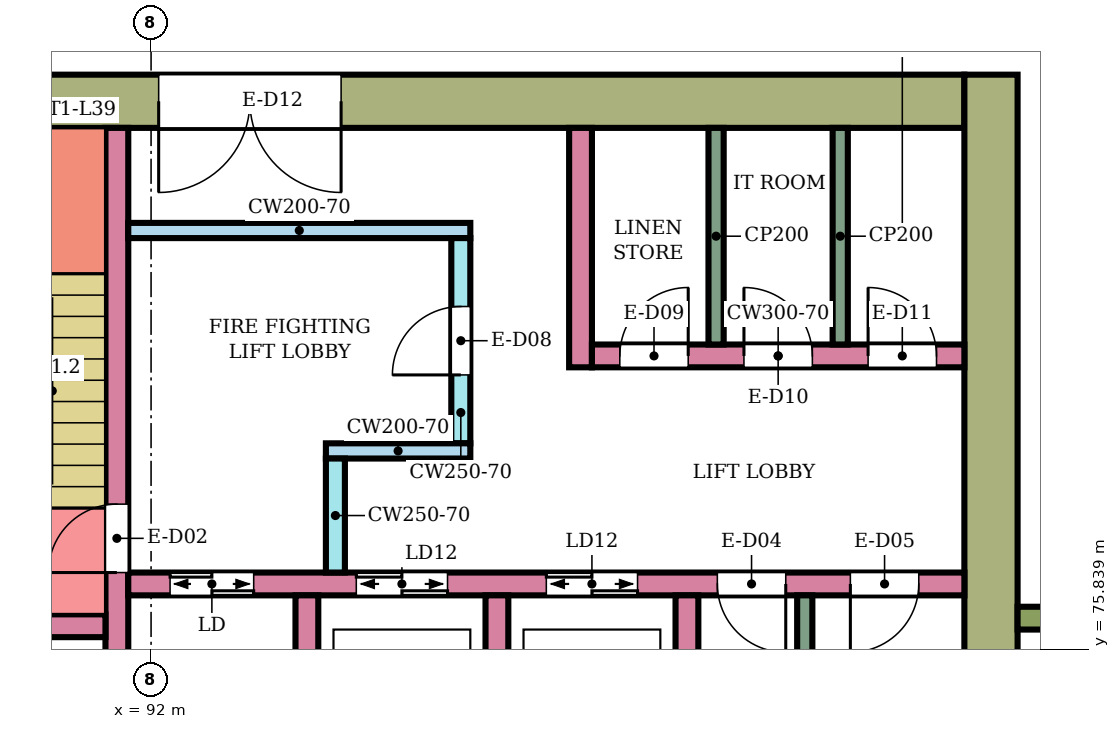
"""IFC4 building model, lengths in metres.
Left out: names, types, materials, properties, quantities, classifications, styles, units other than length and angle.
Written with IfcOpenShell. Run it as: python <this file> out.ifc"""

import sys

from ifc_helpers import new_model, si_unit, direction, frame, frame_2d, origin, place, context, subcontext, project, spatial, rectangle, extrude, element, fill, save


model = new_model("IFC4")
c1 = context("Model", 3, precision=1e-05, world=origin(), true_north=direction((0.0, 1.0)))
c2 = subcontext(c1, "Body", "Model", "MODEL_VIEW")
j1 = project(units=[si_unit("LENGTHUNIT", "METRE"), si_unit("PLANEANGLEUNIT", "RADIAN")], contexts=[c1])
p1 = place(None, origin())
s1 = spatial("IfcSite", under=j1, at=p1, CompositionType="ELEMENT")
p2 = place(p1, origin())
s2 = spatial("IfcBuilding", under=s1, at=p2, CompositionType="ELEMENT")
p3 = place(p2, frame((0.0, 0.0, 170.0)))
s3 = spatial("IfcBuildingStorey", under=s2, at=p3, CompositionType="ELEMENT", Elevation=170.0)
p4 = place(p3, frame((87.9, 83.05, 0.0), z_axis=(0.0, 0.0, 1.0), x_axis=(1.0, 0.0, 0.0)))
e1 = element("IfcWall", 1, at=p4, inside=s3, PredefinedType="SHEAR", context=c2, shape_type="SweptSolid", body=[
    extrude(rectangle(XDim=14.8, YDim=0.7, at=frame_2d((7.4, 0.0))), origin(), (0.0, 0.0, 1.0), 3.78),
])
p5 = place(p4, frame((4.2, 0.0, 0.0)))
e2 = element("IfcOpeningElement", 2, at=p5, cuts=e1, PredefinedType="OPENING", context=c2, shape_type="SweptSolid", body=[
    extrude(rectangle(XDim=2.4, YDim=2.4, at=frame_2d((1.2, 1.2))), frame((0.0, 0.36, 0.0), z_axis=(0.0, -1.0, 0.0), x_axis=(1.0, 0.0, 0.0)), (0.0, 0.0, 1.0), 0.72),
])
p6 = place(p3, frame((103.05, 66.6, 0.0), z_axis=(0.0, 0.0, 1.0), x_axis=(0.0, 1.0, 0.0)))
e3 = element("IfcWall", 3, at=p6, inside=s3, PredefinedType="SHEAR", context=c2, shape_type="SweptSolid", body=[
    extrude(rectangle(XDim=16.8, YDim=0.7, at=frame_2d((8.4, 0.0))), origin(), (0.0, 0.0, 1.0), 3.78),
])
p7 = place(p3, frame((91.55, 75.0, 0.0), z_axis=(0.0, 0.0, 1.0), x_axis=(0.0, 1.0, 0.0)))
e4 = element("IfcWall", 4, at=p7, inside=s3, PredefinedType="SHEAR", context=c2, shape_type="SweptSolid", body=[
    extrude(rectangle(XDim=7.7, YDim=0.3, at=frame_2d((3.85, 0.0))), origin(), (0.0, 0.0, 1.0), 3.78),
])
p8 = place(p7, frame((1.85, 0.0, 0.0)))
e5 = element("IfcOpeningElement", 5, at=p8, cuts=e4, PredefinedType="OPENING", context=c2, shape_type="SweptSolid", body=[
    extrude(rectangle(XDim=0.9, YDim=2.1, at=frame_2d((0.45, 1.05))), frame((0.0, 0.16, 0.0), z_axis=(0.0, -1.0, 0.0), x_axis=(1.0, 0.0, 0.0)), (0.0, 0.0, 1.0), 0.32),
])
p9 = place(p3, frame((88.35, 76.15, 0.0), z_axis=(0.0, 0.0, 1.0), x_axis=(1.0, 0.0, 0.0)))
e6 = element("IfcWall", 6, at=p9, inside=s3, PredefinedType="SHEAR", context=c2, shape_type="SweptSolid", body=[
    extrude(rectangle(XDim=3.05, YDim=0.3, at=frame_2d((1.525, 0.0))), origin(), (0.0, 0.0, 1.0), 3.78),
])
p10 = place(p9, frame((1.1, 0.0, 0.0)))
e7 = element("IfcOpeningElement", 7, at=p10, cuts=e6, PredefinedType="OPENING", context=c2, shape_type="SweptSolid", body=[
    extrude(rectangle(XDim=0.7, YDim=2.0, at=frame_2d((0.35, 1.0))), frame((0.0, 0.16, 0.0), z_axis=(0.0, -1.0, 0.0), x_axis=(1.0, 0.0, 0.0)), (0.0, 0.0, 1.0), 0.32),
])
p11 = place(p3, frame((91.7, 76.7, 0.0), z_axis=(0.0, 0.0, 1.0), x_axis=(1.0, 0.0, 0.0)))
e8 = element("IfcWall", 8, at=p11, inside=s3, PredefinedType="SHEAR", context=c2, shape_type="SweptSolid", body=[
    extrude(rectangle(XDim=11.0, YDim=0.3, at=frame_2d((5.5, 0.0))), origin(), (0.0, 0.0, 1.0), 3.78),
])
p12 = place(p11, frame((0.55, 0.0, 0.0)))
e9 = element("IfcOpeningElement", 9, at=p12, cuts=e8, PredefinedType="OPENING", context=c2, shape_type="SweptSolid", body=[
    extrude(rectangle(XDim=1.1, YDim=2.1, at=frame_2d((0.55, 1.05))), frame((0.0, 0.16, 0.0), z_axis=(0.0, -1.0, 0.0), x_axis=(1.0, 0.0, 0.0)), (0.0, 0.0, 1.0), 0.32),
])
p13 = place(p11, frame((3.0, 0.0, 0.0)))
e10 = element("IfcOpeningElement", 10, at=p13, cuts=e8, PredefinedType="OPENING", context=c2, shape_type="SweptSolid", body=[
    extrude(rectangle(XDim=1.2, YDim=2.1, at=frame_2d((0.6, 1.05))), frame((0.0, 0.16, 0.0), z_axis=(0.0, -1.0, 0.0), x_axis=(1.0, 0.0, 0.0)), (0.0, 0.0, 1.0), 0.32),
])
p14 = place(p11, frame((5.5, 0.0, 0.0)))
e11 = element("IfcOpeningElement", 11, at=p14, cuts=e8, PredefinedType="OPENING", context=c2, shape_type="SweptSolid", body=[
    extrude(rectangle(XDim=1.2, YDim=2.1, at=frame_2d((0.6, 1.05))), frame((0.0, 0.16, 0.0), z_axis=(0.0, -1.0, 0.0), x_axis=(1.0, 0.0, 0.0)), (0.0, 0.0, 1.0), 0.32),
])
p15 = place(p11, frame((7.75, 0.0, 0.0)))
e12 = element("IfcOpeningElement", 12, at=p15, cuts=e8, PredefinedType="OPENING", context=c2, shape_type="SweptSolid", body=[
    extrude(rectangle(XDim=0.9, YDim=2.1, at=frame_2d((0.45, 1.05))), frame((0.0, 0.16, 0.0), z_axis=(0.0, -1.0, 0.0), x_axis=(1.0, 0.0, 0.0)), (0.0, 0.0, 1.0), 0.32),
])
p16 = place(p11, frame((9.5, 0.0, 0.0)))
e13 = element("IfcOpeningElement", 13, at=p16, cuts=e8, PredefinedType="OPENING", context=c2, shape_type="SweptSolid", body=[
    extrude(rectangle(XDim=0.9, YDim=2.1, at=frame_2d((0.45, 1.05))), frame((0.0, 0.16, 0.0), z_axis=(0.0, -1.0, 0.0), x_axis=(1.0, 0.0, 0.0)), (0.0, 0.0, 1.0), 0.32),
])
for number, where, z_axis, x_axis in (
    (14, (94.05, 74.0, 0.0), (0.0, 0.0, 1.0), (0.0, 1.0, 0.0)),
    (15, (96.55, 74.0, 0.0), (0.0, 0.0, 1.0), (0.0, 1.0, 0.0)),
    (16, (99.05, 74.0, 0.0), (0.0, 0.0, 1.0), (0.0, 1.0, 0.0)),
):
    element("IfcWall", number, at=place(p3, frame(where, z_axis=z_axis, x_axis=x_axis)), inside=s3, PredefinedType="SHEAR", context=c2, shape_type="SweptSolid", body=[
        extrude(rectangle(XDim=2.55, YDim=0.3, at=frame_2d((1.275, 0.0))), origin(), (0.0, 0.0, 1.0), 3.78),
    ])
p17 = place(p3, frame((91.7, 81.35, 0.0), z_axis=(0.0, 0.0, 1.0), x_axis=(1.0, 0.0, 0.0)))
e17 = element("IfcWall", 17, at=p17, inside=s3, PredefinedType="SHEAR", context=c2, shape_type="SweptSolid", body=[
    extrude(rectangle(XDim=4.5, YDim=0.2, at=frame_2d((2.25, 0.0))), origin(), (0.0, 0.0, 1.0), 3.78),
])
p18 = place(p3, frame((96.075, 78.55, 0.0), z_axis=(0.0, 0.0, 1.0), x_axis=(0.0, 1.0, 0.0)))
e18 = element("IfcWall", 18, at=p18, inside=s3, PredefinedType="SHEAR", context=c2, shape_type="SweptSolid", body=[
    extrude(rectangle(XDim=2.7, YDim=0.25, at=frame_2d((1.35, 0.0))), origin(), (0.0, 0.0, 1.0), 3.78),
])
p19 = place(p18, frame((0.9, 0.0, 0.0)))
e19 = element("IfcOpeningElement", 19, at=p19, cuts=e18, PredefinedType="OPENING", context=c2, shape_type="SweptSolid", body=[
    extrude(rectangle(XDim=0.9, YDim=2.1, at=frame_2d((0.45, 1.05))), frame((0.0, 0.135, 0.0), z_axis=(0.0, -1.0, 0.0), x_axis=(1.0, 0.0, 0.0)), (0.0, 0.0, 1.0), 0.27),
])
p20 = place(p3, frame((94.3, 78.45, 0.0), z_axis=(0.0, 0.0, 1.0), x_axis=(1.0, 0.0, 0.0)))
e20 = element("IfcWall", 20, at=p20, inside=s3, PredefinedType="SHEAR", context=c2, shape_type="SweptSolid", body=[
    extrude(rectangle(XDim=1.9, YDim=0.2, at=frame_2d((0.95, 0.0))), origin(), (0.0, 0.0, 1.0), 3.78),
])
p21 = place(p3, frame((94.425, 76.85, 0.0), z_axis=(0.0, 0.0, 1.0), x_axis=(0.0, 1.0, 0.0)))
e21 = element("IfcWall", 21, at=p21, inside=s3, PredefinedType="SHEAR", context=c2, shape_type="SweptSolid", body=[
    extrude(rectangle(XDim=1.5, YDim=0.25, at=frame_2d((0.75, 0.0))), origin(), (0.0, 0.0, 1.0), 3.78),
])
p22 = place(p3, frame((97.65, 79.55, 0.0), z_axis=(0.0, 0.0, 1.0), x_axis=(0.0, 1.0, 0.0)))
e22 = element("IfcWall", 22, at=p22, inside=s3, PredefinedType="SHEAR", context=c2, shape_type="SweptSolid", body=[
    extrude(rectangle(XDim=3.15, YDim=0.3, at=frame_2d((1.575, 0.0))), origin(), (0.0, 0.0, 1.0), 3.78),
])
p23 = place(p3, frame((97.8, 79.7, 0.0), z_axis=(0.0, 0.0, 1.0), x_axis=(1.0, 0.0, 0.0)))
e23 = element("IfcWall", 23, at=p23, inside=s3, PredefinedType="SHEAR", context=c2, shape_type="SweptSolid", body=[
    extrude(rectangle(XDim=4.9, YDim=0.3, at=frame_2d((2.45, 0.0))), origin(), (0.0, 0.0, 1.0), 3.78),
])
p24 = place(p23, frame((0.367, 0.0, 0.0)))
e24 = element("IfcOpeningElement", 24, at=p24, cuts=e23, PredefinedType="OPENING", context=c2, shape_type="SweptSolid", body=[
    extrude(rectangle(XDim=0.9, YDim=2.1, at=frame_2d((0.45, 1.05))), frame((0.0, 0.16, 0.0), z_axis=(0.0, -1.0, 0.0), x_axis=(1.0, 0.0, 0.0)), (0.0, 0.0, 1.0), 0.32),
])
p25 = place(p23, frame((2.0, 0.0, 0.0)))
e25 = element("IfcOpeningElement", 25, at=p25, cuts=e23, PredefinedType="OPENING", context=c2, shape_type="SweptSolid", body=[
    extrude(rectangle(XDim=0.9, YDim=2.1, at=frame_2d((0.45, 1.05))), frame((0.0, 0.16, 0.0), z_axis=(0.0, -1.0, 0.0), x_axis=(1.0, 0.0, 0.0)), (0.0, 0.0, 1.0), 0.32),
])
p26 = place(p23, frame((3.633, 0.0, 0.0)))
e26 = element("IfcOpeningElement", 26, at=p26, cuts=e23, PredefinedType="OPENING", context=c2, shape_type="SweptSolid", body=[
    extrude(rectangle(XDim=0.9, YDim=2.1, at=frame_2d((0.45, 1.05))), frame((0.0, 0.16, 0.0), z_axis=(0.0, -1.0, 0.0), x_axis=(1.0, 0.0, 0.0)), (0.0, 0.0, 1.0), 0.32),
])
p27 = place(p3, frame((103.4, 76.25, 0.0), z_axis=(0.0, 0.0, 1.0), x_axis=(1.0, 0.0, 0.0)))
e27 = element("IfcWall", 27, at=p27, inside=s3, PredefinedType="NOTDEFINED", context=c2, shape_type="SweptSolid", body=[
    extrude(rectangle(XDim=2.416, YDim=0.3, at=frame_2d((1.208, 0.0))), origin(), (0.0, 0.0, 1.0), 4.1),
])
p28 = place(p3, frame((100.6, 74.0, 0.0), z_axis=(0.0, 0.0, 1.0), x_axis=(0.0, 1.0, 0.0)))
e28 = element("IfcWall", 28, at=p28, inside=s3, PredefinedType="PARTITIONING", context=c2, shape_type="SweptSolid", body=[
    extrude(rectangle(XDim=2.55, YDim=0.2, at=frame_2d((1.275, 0.0))), origin(), (0.0, 0.0, 1.0), 3.78),
])
for number, where, z_axis, x_axis in (
    (29, (99.433, 79.85, 0.0), (0.0, 0.0, 1.0), (0.0, 1.0, 0.0)),
    (30, (101.067, 79.85, 0.0), (0.0, 0.0, 1.0), (0.0, 1.0, 0.0)),
):
    element("IfcWall", number, at=place(p3, frame(where, z_axis=z_axis, x_axis=x_axis)), inside=s3, PredefinedType="PARTITIONING", context=c2, shape_type="SweptSolid", body=[
        extrude(rectangle(XDim=2.85, YDim=0.2, at=frame_2d((1.425, 0.0))), origin(), (0.0, 0.0, 1.0), 3.78),
    ])
p29 = place(p8, origin())
e31 = element("IfcDoor", 31, at=p29, inside=s3, OperationType="SINGLE_SWING_LEFT", PredefinedType="DOOR", context=c2, shape_type="SweptSolid", body=[
    extrude(rectangle(XDim=0.9, YDim=2.1, at=frame_2d((0.45, 1.05))), frame((0.0, 0.025, 0.0), z_axis=(0.0, -1.0, 0.0), x_axis=(1.0, 0.0, 0.0)), (0.0, 0.0, 1.0), 0.05),
])
fill(e5, e31)
p30 = place(p12, origin())
e32 = element("IfcDoor", 32, at=p30, inside=s3, OperationType="DOUBLE_DOOR_SLIDING", PredefinedType="DOOR", context=c2, shape_type="SweptSolid", body=[
    extrude(rectangle(XDim=1.1, YDim=2.1, at=frame_2d((0.55, 1.05))), frame((0.0, 0.025, 0.0), z_axis=(0.0, -1.0, 0.0), x_axis=(1.0, 0.0, 0.0)), (0.0, 0.0, 1.0), 0.05),
])
fill(e9, e32)
p31 = place(p13, origin())
e33 = element("IfcDoor", 33, at=p31, inside=s3, OperationType="DOUBLE_DOOR_SLIDING", PredefinedType="DOOR", context=c2, shape_type="SweptSolid", body=[
    extrude(rectangle(XDim=1.2, YDim=2.1, at=frame_2d((0.6, 1.05))), frame((0.0, 0.025, 0.0), z_axis=(0.0, -1.0, 0.0), x_axis=(1.0, 0.0, 0.0)), (0.0, 0.0, 1.0), 0.05),
])
fill(e10, e33)
p32 = place(p14, origin())
e34 = element("IfcDoor", 34, at=p32, inside=s3, OperationType="DOUBLE_DOOR_SLIDING", PredefinedType="DOOR", context=c2, shape_type="SweptSolid", body=[
    extrude(rectangle(XDim=1.2, YDim=2.1, at=frame_2d((0.6, 1.05))), frame((0.0, 0.025, 0.0), z_axis=(0.0, -1.0, 0.0), x_axis=(1.0, 0.0, 0.0)), (0.0, 0.0, 1.0), 0.05),
])
fill(e11, e34)
p33 = place(p15, frame((0.9, 0.0, 0.0), z_axis=(0.0, 0.0, 1.0), x_axis=(-1.0, 0.0, 0.0)))
e35 = element("IfcDoor", 35, at=p33, inside=s3, OperationType="SINGLE_SWING_LEFT", PredefinedType="DOOR", context=c2, shape_type="SweptSolid", body=[
    extrude(rectangle(XDim=0.9, YDim=2.1, at=frame_2d((0.45, 1.05))), frame((0.0, 0.025, 0.0), z_axis=(0.0, -1.0, 0.0), x_axis=(1.0, 0.0, 0.0)), (0.0, 0.0, 1.0), 0.05),
])
fill(e12, e35)
p34 = place(p16, frame((0.9, 0.0, 0.0), z_axis=(0.0, 0.0, 1.0), x_axis=(-1.0, 0.0, 0.0)))
e36 = element("IfcDoor", 36, at=p34, inside=s3, OperationType="SINGLE_SWING_RIGHT", PredefinedType="DOOR", context=c2, shape_type="SweptSolid", body=[
    extrude(rectangle(XDim=0.9, YDim=2.1, at=frame_2d((0.45, 1.05))), frame((0.0, 0.025, 0.0), z_axis=(0.0, -1.0, 0.0), x_axis=(1.0, 0.0, 0.0)), (0.0, 0.0, 1.0), 0.05),
])
fill(e13, e36)
p35 = place(p19, origin())
e37 = element("IfcDoor", 37, at=p35, inside=s3, OperationType="SINGLE_SWING_LEFT", PredefinedType="DOOR", context=c2, shape_type="SweptSolid", body=[
    extrude(rectangle(XDim=0.9, YDim=2.1, at=frame_2d((0.45, 1.05))), frame((0.0, 0.025, 0.0), z_axis=(0.0, -1.0, 0.0), x_axis=(1.0, 0.0, 0.0)), (0.0, 0.0, 1.0), 0.05),
])
fill(e19, e37)
p36 = place(p24, origin())
e38 = element("IfcDoor", 38, at=p36, inside=s3, OperationType="SINGLE_SWING_RIGHT", PredefinedType="DOOR", context=c2, shape_type="SweptSolid", body=[
    extrude(rectangle(XDim=0.9, YDim=2.1, at=frame_2d((0.45, 1.05))), frame((0.0, 0.025, 0.0), z_axis=(0.0, -1.0, 0.0), x_axis=(1.0, 0.0, 0.0)), (0.0, 0.0, 1.0), 0.05),
])
fill(e24, e38)
p37 = place(p25, origin())
e39 = element("IfcDoor", 39, at=p37, inside=s3, OperationType="SINGLE_SWING_LEFT", PredefinedType="DOOR", context=c2, shape_type="SweptSolid", body=[
    extrude(rectangle(XDim=0.9, YDim=2.1, at=frame_2d((0.45, 1.05))), frame((0.0, 0.025, 0.0), z_axis=(0.0, -1.0, 0.0), x_axis=(1.0, 0.0, 0.0)), (0.0, 0.0, 1.0), 0.05),
])
fill(e25, e39)
p38 = place(p26, origin())
e40 = element("IfcDoor", 40, at=p38, inside=s3, OperationType="SINGLE_SWING_LEFT", PredefinedType="DOOR", context=c2, shape_type="SweptSolid", body=[
    extrude(rectangle(XDim=0.9, YDim=2.1, at=frame_2d((0.45, 1.05))), frame((0.0, 0.025, 0.0), z_axis=(0.0, -1.0, 0.0), x_axis=(1.0, 0.0, 0.0)), (0.0, 0.0, 1.0), 0.05),
])
fill(e26, e40)
p39 = place(p5, frame((2.4, 0.0, 0.0), z_axis=(0.0, 0.0, 1.0), x_axis=(-1.0, 0.0, 0.0)))
e41 = element("IfcDoor", 41, at=p39, inside=s3, OperationType="DOUBLE_DOOR_SINGLE_SWING", PredefinedType="DOOR", context=c2, shape_type="SweptSolid", body=[
    extrude(rectangle(XDim=2.4, YDim=2.4, at=frame_2d((1.2, 1.2))), frame((0.0, 0.025, 0.0), z_axis=(0.0, -1.0, 0.0), x_axis=(1.0, 0.0, 0.0)), (0.0, 0.0, 1.0), 0.05),
])
fill(e2, e41)
save(model, sys.argv[1])
